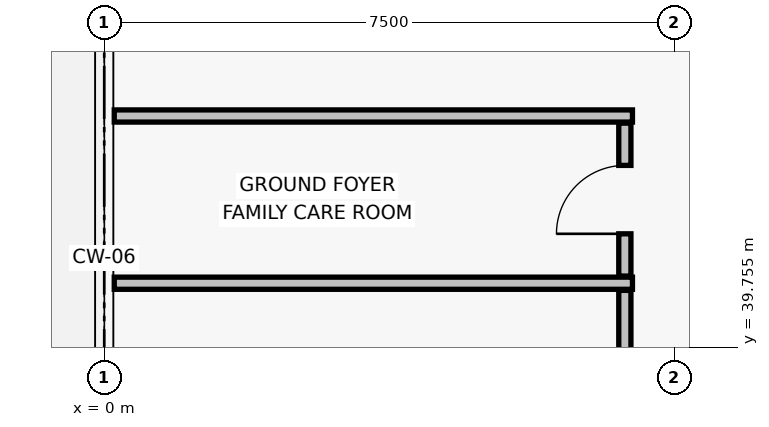
"""IFC4 building model, lengths in metres.
Left out: names, types, materials, properties, quantities, classifications, styles, units other than length and angle.
Written with IfcOpenShell. Run it as: python <this file> out.ifc"""

import sys

from ifc_helpers import new_model, si_unit, direction, frame, frame_2d, origin, place, context, subcontext, project, spatial, rectangle, extrude, element, fill, save


model = new_model("IFC4")
c1 = context("Model", 3, precision=1e-05, world=origin(), true_north=direction((0.0, 1.0)))
c2 = subcontext(c1, "Body", "Model", "MODEL_VIEW")
j1 = project(units=[si_unit("LENGTHUNIT", "METRE"), si_unit("PLANEANGLEUNIT", "RADIAN")], contexts=[c1])
p1 = place(None, origin())
s1 = spatial("IfcSite", under=j1, at=p1, CompositionType="ELEMENT")
p2 = place(p1, origin())
s2 = spatial("IfcBuilding", under=s1, at=p2, CompositionType="ELEMENT")
p3 = place(p2, origin())
s3 = spatial("IfcBuildingStorey", under=s2, at=p3, CompositionType="ELEMENT", Elevation=0.0)
for number, where, z_axis, x_axis in (
    (1, (0.132, 40.6, 0.0), (0.0, 0.0, 1.0), (1.0, 0.0, 0.0)),
    (2, (0.132, 42.8, 0.0), (0.0, 0.0, 1.0), (1.0, 0.0, 0.0)),
):
    element("IfcWall", number, at=place(p3, frame(where, z_axis=z_axis, x_axis=x_axis)), inside=s3, PredefinedType="PARTITIONING", context=c2, shape_type="SweptSolid", body=[
        extrude(rectangle(XDim=6.818, YDim=0.16, at=frame_2d((3.409, 0.0))), origin(), (0.0, 0.0, 1.0), 3.72),
    ])
p4 = place(p3, frame((6.85, 37.594, 0.0), z_axis=(0.0, 0.0, 1.0), x_axis=(0.0, 1.0, 0.0)))
e3 = element("IfcWall", 3, at=p4, inside=s3, PredefinedType="PARTITIONING", context=c2, shape_type="SweptSolid", body=[
    extrude(rectangle(XDim=2.912, YDim=0.16, at=frame_2d((1.456, 0.0))), origin(), (0.0, 0.0, 1.0), 2.97),
])
p5 = place(p4, frame((0.981, 0.0, 0.0)))
e4 = element("IfcOpeningElement", 4, at=p5, cuts=e3, PredefinedType="OPENING", context=c2, shape_type="SweptSolid", body=[
    extrude(rectangle(XDim=0.95, YDim=2.1, at=frame_2d((0.475, 1.05))), frame((0.0, 0.09, 0.0), z_axis=(0.0, -1.0, 0.0), x_axis=(1.0, 0.0, 0.0)), (0.0, 0.0, 1.0), 0.18),
])
p6 = place(p3, frame((6.85, 40.694, 0.0), z_axis=(0.0, 0.0, 1.0), x_axis=(0.0, 1.0, 0.0)))
e5 = element("IfcWall", 5, at=p6, inside=s3, PredefinedType="PARTITIONING", context=c2, shape_type="SweptSolid", body=[
    extrude(rectangle(XDim=2.012, YDim=0.16, at=frame_2d((1.006, 0.0))), origin(), (0.0, 0.0, 1.0), 3.87),
])
p7 = place(p6, frame((0.556, 0.0, 0.0)))
e6 = element("IfcOpeningElement", 6, at=p7, cuts=e5, PredefinedType="OPENING", context=c2, shape_type="SweptSolid", body=[
    extrude(rectangle(XDim=0.9, YDim=2.1, at=frame_2d((0.45, 1.05))), frame((0.0, 0.09, 0.0), z_axis=(0.0, -1.0, 0.0), x_axis=(1.0, 0.0, 0.0)), (0.0, 0.0, 1.0), 0.18),
])
p8 = place(p7, origin())
e7 = element("IfcDoor", 7, at=p8, inside=s3, OperationType="SINGLE_SWING_LEFT", PredefinedType="DOOR", context=c2, shape_type="SweptSolid", body=[
    extrude(rectangle(XDim=0.9, YDim=2.1, at=frame_2d((0.45, 1.05))), frame((0.0, 0.025, 0.0), z_axis=(0.0, -1.0, 0.0), x_axis=(1.0, 0.0, 0.0)), (0.0, 0.0, 1.0), 0.05),
])
fill(e6, e7)
save(model, sys.argv[1])
